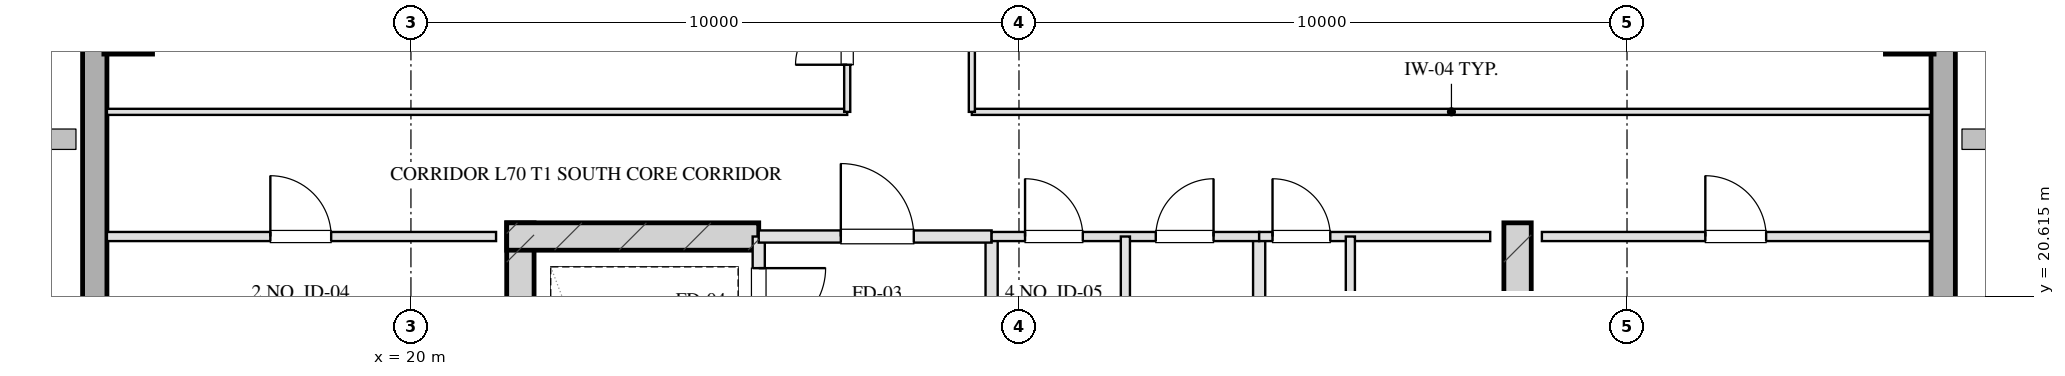
"""IFC4 building model, lengths in metres.
Left out: names, types, materials, properties, quantities, classifications, styles, units other than length and angle.
Written with IfcOpenShell. Run it as: python <this file> out.ifc"""

import sys

from ifc_helpers import new_model, si_unit, direction, frame, frame_2d, origin, origin_2d, place, context, subcontext, project, spatial, rectangle, hollow_rectangle, extrude, element, fill, save


model = new_model("IFC4")
c1 = context("Model", 3, precision=1e-05, world=origin(), true_north=direction((0.0, 1.0)))
c2 = subcontext(c1, "Body", "Model", "MODEL_VIEW")
j1 = project(units=[si_unit("LENGTHUNIT", "METRE"), si_unit("PLANEANGLEUNIT", "RADIAN")], contexts=[c1])
p1 = place(None, origin())
s1 = spatial("IfcSite", under=j1, at=p1, CompositionType="ELEMENT")
p2 = place(p1, origin())
s2 = spatial("IfcBuilding", under=s1, at=p2, CompositionType="ELEMENT")
p3 = place(p2, frame((0.0, 0.0, 256.8)))
s3 = spatial("IfcBuildingStorey", under=s2, at=p3, CompositionType="ELEMENT", Elevation=256.8)
for number, where, z_axis, x_axis in (
    (1, (21.8, 21.825, 0.0), (0.0, 0.0, 1.0), (0.0, -1.0, 0.0)),
    (2, (38.2, 21.825, 0.0), (0.0, 0.0, 1.0), (0.0, -1.0, 0.0)),
):
    element("IfcWall", number, at=place(p3, frame(where, z_axis=z_axis, x_axis=x_axis)), inside=s3, PredefinedType="SHEAR", context=c2, shape_type="SweptSolid", body=[
        extrude(rectangle(XDim=9.33, YDim=0.45, at=frame_2d((4.665, 0.0))), origin(), (0.0, 0.0, 1.0), 3.2),
    ])
p4 = place(p3, frame((21.575, 21.6, 0.0), z_axis=(0.0, 0.0, 1.0), x_axis=(1.0, 0.0, 0.0)))
e3 = element("IfcWall", 3, at=p4, inside=s3, PredefinedType="SHEAR", context=c2, shape_type="SweptSolid", body=[
    extrude(rectangle(XDim=4.145, YDim=0.45, at=frame_2d((2.073, 0.0))), origin(), (0.0, 0.0, 1.0), 3.2),
])
for number, where, z_axis, x_axis in (
    (4, (15.35, 25.0, 0.0), (0.0, 0.0, 1.0), (1.0, 0.0, 0.0)),
    (5, (44.65, 25.0, 0.0), (0.0, 0.0, 1.0), (1.0, 0.0, 0.0)),
):
    element("IfcColumn", number, at=place(p3, frame(where, z_axis=z_axis, x_axis=x_axis)), inside=s3, PredefinedType="COLUMN", context=c2, shape_type="SweptSolid", body=[
        extrude(hollow_rectangle(XDim=0.8, YDim=0.8, WallThickness=0.028, at=origin_2d()), origin(), (0.0, 0.0, 1.0), 3.201),
    ])
p5 = place(p3, frame((14.8, 13.1, 0.0), z_axis=(0.0, 0.0, 1.0), x_axis=(0.0, 1.0, 0.0)))
e6 = element("IfcWall", 6, at=p5, inside=s3, PredefinedType="SOLIDWALL", context=c2, shape_type="SweptSolid", body=[
    extrude(rectangle(XDim=41.8, YDim=0.4, at=frame_2d((20.9, 0.0))), origin(), (0.0, 0.0, 1.0), 2.36),
])
p6 = place(p5, frame((22.525, 0.0, 0.75)))
e7 = element("IfcOpeningElement", 7, at=p6, cuts=e6, PredefinedType="OPENING", context=c2, shape_type="SweptSolid", body=[
    extrude(rectangle(XDim=1.95, YDim=1.21, at=frame_2d((0.975, 0.605))), frame((0.0, 0.21, 0.0), z_axis=(0.0, -1.0, 0.0), x_axis=(1.0, 0.0, 0.0)), (0.0, 0.0, 1.0), 0.42),
])
p7 = place(p5, frame((26.325, 0.0, 0.75)))
e8 = element("IfcOpeningElement", 8, at=p7, cuts=e6, PredefinedType="OPENING", context=c2, shape_type="SweptSolid", body=[
    extrude(rectangle(XDim=1.95, YDim=1.21, at=frame_2d((0.975, 0.605))), frame((0.0, 0.21, 0.0), z_axis=(0.0, -1.0, 0.0), x_axis=(1.0, 0.0, 0.0)), (0.0, 0.0, 1.0), 0.42),
])
p8 = place(p5, frame((14.55, 0.0, 0.0)))
e9 = element("IfcOpeningElement", 9, at=p8, cuts=e6, PredefinedType="OPENING", context=c2, shape_type="SweptSolid", body=[
    extrude(rectangle(XDim=1.1, YDim=2.15, at=frame_2d((0.55, 1.075))), frame((0.0, 0.21, 0.0), z_axis=(0.0, -1.0, 0.0), x_axis=(1.0, 0.0, 0.0)), (0.0, 0.0, 1.0), 0.42),
])
p9 = place(p3, frame((45.2, 54.9, 0.0), z_axis=(0.0, 0.0, 1.0), x_axis=(0.0, -1.0, 0.0)))
e10 = element("IfcWall", 10, at=p9, inside=s3, PredefinedType="SOLIDWALL", context=c2, shape_type="SweptSolid", body=[
    extrude(rectangle(XDim=41.8, YDim=0.4, at=frame_2d((20.9, 0.0))), origin(), (0.0, 0.0, 1.0), 2.36),
])
p10 = place(p9, frame((17.325, 0.0, 0.75)))
e11 = element("IfcOpeningElement", 11, at=p10, cuts=e10, PredefinedType="OPENING", context=c2, shape_type="SweptSolid", body=[
    extrude(rectangle(XDim=1.95, YDim=1.21, at=frame_2d((0.975, 0.605))), frame((0.0, 0.21, 0.0), z_axis=(0.0, -1.0, 0.0), x_axis=(1.0, 0.0, 0.0)), (0.0, 0.0, 1.0), 0.42),
])
p11 = place(p9, frame((13.525, 0.0, 0.75)))
e12 = element("IfcOpeningElement", 12, at=p11, cuts=e10, PredefinedType="OPENING", context=c2, shape_type="SweptSolid", body=[
    extrude(rectangle(XDim=1.95, YDim=1.21, at=frame_2d((0.975, 0.605))), frame((0.0, 0.21, 0.0), z_axis=(0.0, -1.0, 0.0), x_axis=(1.0, 0.0, 0.0)), (0.0, 0.0, 1.0), 0.42),
])
p12 = place(p9, frame((23.45, 0.0, 0.0)))
e13 = element("IfcOpeningElement", 13, at=p12, cuts=e10, PredefinedType="OPENING", context=c2, shape_type="SweptSolid", body=[
    extrude(rectangle(XDim=1.1, YDim=2.15, at=frame_2d((0.55, 1.075))), frame((0.0, 0.21, 0.0), z_axis=(0.0, -1.0, 0.0), x_axis=(1.0, 0.0, 0.0)), (0.0, 0.0, 1.0), 0.42),
])
p13 = place(p3, frame((25.72, 21.6, 0.0), z_axis=(0.0, 0.0, 1.0), x_axis=(0.0, -1.0, 0.0)))
e14 = element("IfcWall", 14, at=p13, inside=s3, PredefinedType="PARTITIONING", context=c2, shape_type="SweptSolid", body=[
    extrude(rectangle(XDim=1.9, YDim=0.2, at=frame_2d((0.95, 0.0))), origin(), (0.0, 0.0, 1.0), 2.925),
])
p14 = place(p13, frame((0.52, 0.0, 0.0)))
e15 = element("IfcOpeningElement", 15, at=p14, cuts=e14, PredefinedType="OPENING", context=c2, shape_type="SweptSolid", body=[
    extrude(rectangle(XDim=1.1, YDim=2.05, at=frame_2d((0.55, 1.025))), frame((0.0, 0.11, 0.0), z_axis=(0.0, -1.0, 0.0), x_axis=(1.0, 0.0, 0.0)), (0.0, 0.0, 1.0), 0.22),
])
p15 = place(p3, frame((29.55, 21.6, 0.0), z_axis=(0.0, 0.0, 1.0), x_axis=(0.0, -1.0, 0.0)))
e16 = element("IfcWall", 16, at=p15, inside=s3, PredefinedType="PARTITIONING", context=c2, shape_type="SweptSolid", body=[
    extrude(rectangle(XDim=8.43, YDim=0.2, at=frame_2d((4.215, 0.0))), origin(), (0.0, 0.0, 1.0), 2.925),
])
p16 = place(p3, frame((25.72, 21.6, 0.0), z_axis=(0.0, 0.0, 1.0), x_axis=(1.0, 0.0, 0.0)))
e17 = element("IfcWall", 17, at=p16, inside=s3, PredefinedType="PARTITIONING", context=c2, shape_type="SweptSolid", body=[
    extrude(rectangle(XDim=3.83, YDim=0.2, at=frame_2d((1.915, 0.0))), origin(), (0.0, 0.0, 1.0), 2.925),
])
p17 = place(p16, frame((1.35, 0.0, 0.0)))
e18 = element("IfcOpeningElement", 18, at=p17, cuts=e17, PredefinedType="OPENING", context=c2, shape_type="SweptSolid", body=[
    extrude(rectangle(XDim=1.2, YDim=2.05, at=frame_2d((0.6, 1.025))), frame((0.0, 0.11, 0.0), z_axis=(0.0, -1.0, 0.0), x_axis=(1.0, 0.0, 0.0)), (0.0, 0.0, 1.0), 0.22),
])
p18 = place(p3, frame((33.95, 21.6, 0.0), z_axis=(0.0, 0.0, 1.0), x_axis=(0.0, -1.0, 0.0)))
e19 = element("IfcWall", 19, at=p18, inside=s3, PredefinedType="PARTITIONING", context=c2, shape_type="SweptSolid", body=[
    extrude(rectangle(XDim=8.43, YDim=0.2, at=frame_2d((4.215, 0.0))), origin(), (0.0, 0.0, 1.0), 2.925),
])
p19 = place(p3, frame((29.55, 21.6, 0.0), z_axis=(0.0, 0.0, 1.0), x_axis=(1.0, 0.0, 0.0)))
e20 = element("IfcWall", 20, at=p19, inside=s3, PredefinedType="PARTITIONING", context=c2, shape_type="SweptSolid", body=[
    extrude(rectangle(XDim=4.4, YDim=0.15, at=frame_2d((2.2, 0.0))), origin(), (0.0, 0.0, 1.0), 2.925),
])
p20 = place(p19, frame((0.55, 0.0, 0.0)))
e21 = element("IfcOpeningElement", 21, at=p20, cuts=e20, PredefinedType="OPENING", context=c2, shape_type="SweptSolid", body=[
    extrude(rectangle(XDim=0.95, YDim=2.05, at=frame_2d((0.475, 1.025))), frame((0.0, 0.085, 0.0), z_axis=(0.0, -1.0, 0.0), x_axis=(1.0, 0.0, 0.0)), (0.0, 0.0, 1.0), 0.17),
])
p21 = place(p19, frame((2.7, 0.0, 0.0)))
e22 = element("IfcOpeningElement", 22, at=p21, cuts=e20, PredefinedType="OPENING", context=c2, shape_type="SweptSolid", body=[
    extrude(rectangle(XDim=0.95, YDim=2.05, at=frame_2d((0.475, 1.025))), frame((0.0, 0.085, 0.0), z_axis=(0.0, -1.0, 0.0), x_axis=(1.0, 0.0, 0.0)), (0.0, 0.0, 1.0), 0.17),
])
p22 = place(p3, frame((31.75, 21.6, 0.0), z_axis=(0.0, 0.0, 1.0), x_axis=(0.0, -1.0, 0.0)))
e23 = element("IfcWall", 23, at=p22, inside=s3, PredefinedType="PARTITIONING", context=c2, shape_type="SweptSolid", body=[
    extrude(rectangle(XDim=8.43, YDim=0.15, at=frame_2d((4.215, 0.0))), origin(), (0.0, 0.0, 1.0), 2.925),
])
p23 = place(p3, frame((33.95, 21.6, 0.0), z_axis=(0.0, 0.0, 1.0), x_axis=(1.0, 0.0, 0.0)))
e24 = element("IfcWall", 24, at=p23, inside=s3, PredefinedType="PARTITIONING", context=c2, shape_type="SweptSolid", body=[
    extrude(rectangle(XDim=3.8, YDim=0.15, at=frame_2d((1.9, 0.0))), origin(), (0.0, 0.0, 1.0), 2.925),
])
p24 = place(p23, frame((0.22, 0.0, 0.0)))
e25 = element("IfcOpeningElement", 25, at=p24, cuts=e24, PredefinedType="OPENING", context=c2, shape_type="SweptSolid", body=[
    extrude(rectangle(XDim=0.95, YDim=2.05, at=frame_2d((0.475, 1.025))), frame((0.0, 0.085, 0.0), z_axis=(0.0, -1.0, 0.0), x_axis=(1.0, 0.0, 0.0)), (0.0, 0.0, 1.0), 0.17),
])
p25 = place(p3, frame((35.45, 21.6, 0.0), z_axis=(0.0, 0.0, 1.0), x_axis=(0.0, -1.0, 0.0)))
e26 = element("IfcWall", 26, at=p25, inside=s3, PredefinedType="PARTITIONING", context=c2, shape_type="SweptSolid", body=[
    extrude(rectangle(XDim=8.43, YDim=0.15, at=frame_2d((4.215, 0.0))), origin(), (0.0, 0.0, 1.0), 2.515),
])
p26 = place(p25, frame((2.55, 0.0, 0.0)))
e27 = element("IfcOpeningElement", 27, at=p26, cuts=e26, PredefinedType="OPENING", context=c2, shape_type="SweptSolid", body=[
    extrude(rectangle(XDim=0.95, YDim=2.05, at=frame_2d((0.475, 1.025))), frame((0.0, 0.085, 0.0), z_axis=(0.0, -1.0, 0.0), x_axis=(1.0, 0.0, 0.0)), (0.0, 0.0, 1.0), 0.17),
])
p27 = place(p25, frame((5.8, 0.0, 0.0)))
e28 = element("IfcOpeningElement", 28, at=p27, cuts=e26, PredefinedType="OPENING", context=c2, shape_type="SweptSolid", body=[
    extrude(rectangle(XDim=0.9, YDim=2.05, at=frame_2d((0.45, 1.025))), frame((0.0, 0.085, 0.0), z_axis=(0.0, -1.0, 0.0), x_axis=(1.0, 0.0, 0.0)), (0.0, 0.0, 1.0), 0.17),
])
p28 = place(p3, frame((15.0, 21.6, 0.0), z_axis=(0.0, 0.0, 1.0), x_axis=(1.0, 0.0, 0.0)))
e29 = element("IfcWall", 29, at=p28, inside=s3, PredefinedType="PARTITIONING", context=c2, shape_type="SweptSolid", body=[
    extrude(rectangle(XDim=6.4, YDim=0.15, at=frame_2d((3.2, 0.0))), origin(), (0.0, 0.0, 1.0), 2.925),
])
p29 = place(p28, frame((2.688, 0.0, 0.0)))
e30 = element("IfcOpeningElement", 30, at=p29, cuts=e29, PredefinedType="OPENING", context=c2, shape_type="SweptSolid", body=[
    extrude(rectangle(XDim=1.0, YDim=2.05, at=frame_2d((0.5, 1.025))), frame((0.0, 0.085, 0.0), z_axis=(0.0, -1.0, 0.0), x_axis=(1.0, 0.0, 0.0)), (0.0, 0.0, 1.0), 0.17),
])
p30 = place(p3, frame((38.6, 21.6, 0.0), z_axis=(0.0, 0.0, 1.0), x_axis=(1.0, 0.0, 0.0)))
e31 = element("IfcWall", 31, at=p30, inside=s3, PredefinedType="PARTITIONING", context=c2, shape_type="SweptSolid", body=[
    extrude(rectangle(XDim=6.4, YDim=0.15, at=frame_2d((3.2, 0.0))), origin(), (0.0, 0.0, 1.0), 2.925),
])
p31 = place(p30, frame((2.688, 0.0, 0.0)))
e32 = element("IfcOpeningElement", 32, at=p31, cuts=e31, PredefinedType="OPENING", context=c2, shape_type="SweptSolid", body=[
    extrude(rectangle(XDim=1.0, YDim=2.05, at=frame_2d((0.5, 1.025))), frame((0.0, 0.085, 0.0), z_axis=(0.0, -1.0, 0.0), x_axis=(1.0, 0.0, 0.0)), (0.0, 0.0, 1.0), 0.17),
])
p32 = place(p3, frame((15.0, 23.65, 0.0), z_axis=(0.0, 0.0, 1.0), x_axis=(1.0, 0.0, 0.0)))
e33 = element("IfcWall", 33, at=p32, inside=s3, PredefinedType="MOVABLE", context=c2, shape_type="SweptSolid", body=[
    extrude(rectangle(XDim=12.175, YDim=0.1, at=frame_2d((6.087, 0.0))), origin(), (0.0, 0.0, 1.0), 2.925),
])
p33 = place(p3, frame((29.225, 23.65, 0.0), z_axis=(0.0, 0.0, 1.0), x_axis=(1.0, 0.0, 0.0)))
e34 = element("IfcWall", 34, at=p33, inside=s3, PredefinedType="MOVABLE", context=c2, shape_type="SweptSolid", body=[
    extrude(rectangle(XDim=15.775, YDim=0.1, at=frame_2d((7.887, 0.0))), origin(), (0.0, 0.0, 1.0), 2.925),
])
p34 = place(p3, frame((27.175, 23.65, 0.0), z_axis=(0.0, 0.0, 1.0), x_axis=(0.0, 1.0, 0.0)))
e35 = element("IfcWall", 35, at=p34, inside=s3, PredefinedType="MOVABLE", context=c2, shape_type="SweptSolid", body=[
    extrude(rectangle(XDim=20.7, YDim=0.1, at=frame_2d((10.35, 0.0))), origin(), (0.0, 0.0, 1.0), 2.925),
])
p35 = place(p34, frame((0.775, 0.0, 0.0)))
e36 = element("IfcOpeningElement", 36, at=p35, cuts=e35, PredefinedType="OPENING", context=c2, shape_type="SweptSolid", body=[
    extrude(rectangle(XDim=0.85, YDim=2.05, at=frame_2d((0.425, 1.025))), frame((0.0, 0.06, 0.0), z_axis=(0.0, -1.0, 0.0), x_axis=(1.0, 0.0, 0.0)), (0.0, 0.0, 1.0), 0.12),
])
p36 = place(p34, frame((3.95, 0.0, 0.0)))
e37 = element("IfcOpeningElement", 37, at=p36, cuts=e35, PredefinedType="OPENING", context=c2, shape_type="SweptSolid", body=[
    extrude(rectangle(XDim=1.0, YDim=2.05, at=frame_2d((0.5, 1.025))), frame((0.0, 0.06, 0.0), z_axis=(0.0, -1.0, 0.0), x_axis=(1.0, 0.0, 0.0)), (0.0, 0.0, 1.0), 0.12),
])
p37 = place(p34, frame((8.364, 0.0, 0.0)))
e38 = element("IfcOpeningElement", 38, at=p37, cuts=e35, PredefinedType="OPENING", context=c2, shape_type="SweptSolid", body=[
    extrude(rectangle(XDim=1.05, YDim=2.05, at=frame_2d((0.525, 1.025))), frame((0.0, 0.06, 0.0), z_axis=(0.0, -1.0, 0.0), x_axis=(1.0, 0.0, 0.0)), (0.0, 0.0, 1.0), 0.12),
])
p38 = place(p34, frame((12.844, 0.0, 0.0)))
e39 = element("IfcOpeningElement", 39, at=p38, cuts=e35, PredefinedType="OPENING", context=c2, shape_type="SweptSolid", body=[
    extrude(rectangle(XDim=1.0, YDim=2.05, at=frame_2d((0.5, 1.025))), frame((0.0, 0.06, 0.0), z_axis=(0.0, -1.0, 0.0), x_axis=(1.0, 0.0, 0.0)), (0.0, 0.0, 1.0), 0.12),
])
p39 = place(p34, frame((16.364, 0.0, 0.0)))
e40 = element("IfcOpeningElement", 40, at=p39, cuts=e35, PredefinedType="OPENING", context=c2, shape_type="SweptSolid", body=[
    extrude(rectangle(XDim=1.0, YDim=2.05, at=frame_2d((0.5, 1.025))), frame((0.0, 0.06, 0.0), z_axis=(0.0, -1.0, 0.0), x_axis=(1.0, 0.0, 0.0)), (0.0, 0.0, 1.0), 0.12),
])
p40 = place(p34, frame((19.058, 0.0, 0.0)))
e41 = element("IfcOpeningElement", 41, at=p40, cuts=e35, PredefinedType="OPENING", context=c2, shape_type="SweptSolid", body=[
    extrude(rectangle(XDim=1.0, YDim=2.05, at=frame_2d((0.5, 1.025))), frame((0.0, 0.06, 0.0), z_axis=(0.0, -1.0, 0.0), x_axis=(1.0, 0.0, 0.0)), (0.0, 0.0, 1.0), 0.12),
])
p41 = place(p3, frame((29.225, 23.65, 0.0), z_axis=(0.0, 0.0, 1.0), x_axis=(0.0, 1.0, 0.0)))
e42 = element("IfcWall", 42, at=p41, inside=s3, PredefinedType="MOVABLE", context=c2, shape_type="SweptSolid", body=[
    extrude(rectangle(XDim=20.7, YDim=0.1, at=frame_2d((10.35, 0.0))), origin(), (0.0, 0.0, 1.0), 2.925),
])
p42 = place(p41, frame((2.175, 0.0, 0.0)))
e43 = element("IfcOpeningElement", 43, at=p42, cuts=e42, PredefinedType="OPENING", context=c2, shape_type="SweptSolid", body=[
    extrude(rectangle(XDim=1.0, YDim=2.05, at=frame_2d((0.5, 1.025))), frame((0.0, 0.06, 0.0), z_axis=(0.0, -1.0, 0.0), x_axis=(1.0, 0.0, 0.0)), (0.0, 0.0, 1.0), 0.12),
])
p43 = place(p41, frame((7.69, 0.0, 0.0)))
e44 = element("IfcOpeningElement", 44, at=p43, cuts=e42, PredefinedType="OPENING", context=c2, shape_type="SweptSolid", body=[
    extrude(rectangle(XDim=1.0, YDim=2.05, at=frame_2d((0.5, 1.025))), frame((0.0, 0.06, 0.0), z_axis=(0.0, -1.0, 0.0), x_axis=(1.0, 0.0, 0.0)), (0.0, 0.0, 1.0), 0.12),
])
p44 = place(p41, frame((12.69, 0.0, 0.0)))
e45 = element("IfcOpeningElement", 45, at=p44, cuts=e42, PredefinedType="OPENING", context=c2, shape_type="SweptSolid", body=[
    extrude(rectangle(XDim=1.0, YDim=2.05, at=frame_2d((0.5, 1.025))), frame((0.0, 0.06, 0.0), z_axis=(0.0, -1.0, 0.0), x_axis=(1.0, 0.0, 0.0)), (0.0, 0.0, 1.0), 0.12),
])
p45 = place(p41, frame((17.525, 0.0, 0.0)))
e46 = element("IfcOpeningElement", 46, at=p45, cuts=e42, PredefinedType="OPENING", context=c2, shape_type="SweptSolid", body=[
    extrude(rectangle(XDim=1.05, YDim=2.05, at=frame_2d((0.525, 1.025))), frame((0.0, 0.06, 0.0), z_axis=(0.0, -1.0, 0.0), x_axis=(1.0, 0.0, 0.0)), (0.0, 0.0, 1.0), 0.12),
])
p46 = place(p14, origin())
e47 = element("IfcDoor", 47, at=p46, inside=s3, OperationType="SINGLE_SWING_LEFT", PredefinedType="DOOR", context=c2, shape_type="SweptSolid", body=[
    extrude(rectangle(XDim=1.1, YDim=2.05, at=frame_2d((0.55, 1.025))), frame((0.0, 0.025, 0.0), z_axis=(0.0, -1.0, 0.0), x_axis=(1.0, 0.0, 0.0)), (0.0, 0.0, 1.0), 0.05),
])
fill(e15, e47)
p47 = place(p17, origin())
e48 = element("IfcDoor", 48, at=p47, inside=s3, OperationType="SINGLE_SWING_LEFT", PredefinedType="DOOR", context=c2, shape_type="SweptSolid", body=[
    extrude(rectangle(XDim=1.2, YDim=2.05, at=frame_2d((0.6, 1.025))), frame((0.0, 0.025, 0.0), z_axis=(0.0, -1.0, 0.0), x_axis=(1.0, 0.0, 0.0)), (0.0, 0.0, 1.0), 0.05),
])
fill(e18, e48)
p48 = place(p20, origin())
e49 = element("IfcDoor", 49, at=p48, inside=s3, OperationType="SINGLE_SWING_LEFT", PredefinedType="DOOR", context=c2, shape_type="SweptSolid", body=[
    extrude(rectangle(XDim=0.95, YDim=2.05, at=frame_2d((0.475, 1.025))), frame((0.0, 0.025, 0.0), z_axis=(0.0, -1.0, 0.0), x_axis=(1.0, 0.0, 0.0)), (0.0, 0.0, 1.0), 0.05),
])
fill(e21, e49)
p49 = place(p21, origin())
e50 = element("IfcDoor", 50, at=p49, inside=s3, OperationType="SINGLE_SWING_RIGHT", PredefinedType="DOOR", context=c2, shape_type="SweptSolid", body=[
    extrude(rectangle(XDim=0.95, YDim=2.05, at=frame_2d((0.475, 1.025))), frame((0.0, 0.025, 0.0), z_axis=(0.0, -1.0, 0.0), x_axis=(1.0, 0.0, 0.0)), (0.0, 0.0, 1.0), 0.05),
])
fill(e22, e50)
p50 = place(p24, origin())
e51 = element("IfcDoor", 51, at=p50, inside=s3, OperationType="SINGLE_SWING_LEFT", PredefinedType="DOOR", context=c2, shape_type="SweptSolid", body=[
    extrude(rectangle(XDim=0.95, YDim=2.05, at=frame_2d((0.475, 1.025))), frame((0.0, 0.025, 0.0), z_axis=(0.0, -1.0, 0.0), x_axis=(1.0, 0.0, 0.0)), (0.0, 0.0, 1.0), 0.05),
])
fill(e25, e51)
p51 = place(p29, origin())
e52 = element("IfcDoor", 52, at=p51, inside=s3, OperationType="SINGLE_SWING_LEFT", PredefinedType="DOOR", context=c2, shape_type="SweptSolid", body=[
    extrude(rectangle(XDim=1.0, YDim=2.05, at=frame_2d((0.5, 1.025))), frame((0.0, 0.025, 0.0), z_axis=(0.0, -1.0, 0.0), x_axis=(1.0, 0.0, 0.0)), (0.0, 0.0, 1.0), 0.05),
])
fill(e30, e52)
p52 = place(p31, origin())
e53 = element("IfcDoor", 53, at=p52, inside=s3, OperationType="SINGLE_SWING_LEFT", PredefinedType="DOOR", context=c2, shape_type="SweptSolid", body=[
    extrude(rectangle(XDim=1.0, YDim=2.05, at=frame_2d((0.5, 1.025))), frame((0.0, 0.025, 0.0), z_axis=(0.0, -1.0, 0.0), x_axis=(1.0, 0.0, 0.0)), (0.0, 0.0, 1.0), 0.05),
])
fill(e32, e53)
p53 = place(p35, origin())
e54 = element("IfcDoor", 54, at=p53, inside=s3, OperationType="SINGLE_SWING_LEFT", PredefinedType="DOOR", context=c2, shape_type="SweptSolid", body=[
    extrude(rectangle(XDim=0.85, YDim=2.05, at=frame_2d((0.425, 1.025))), frame((0.0, 0.025, 0.0), z_axis=(0.0, -1.0, 0.0), x_axis=(1.0, 0.0, 0.0)), (0.0, 0.0, 1.0), 0.05),
])
fill(e36, e54)
save(model, sys.argv[1])
